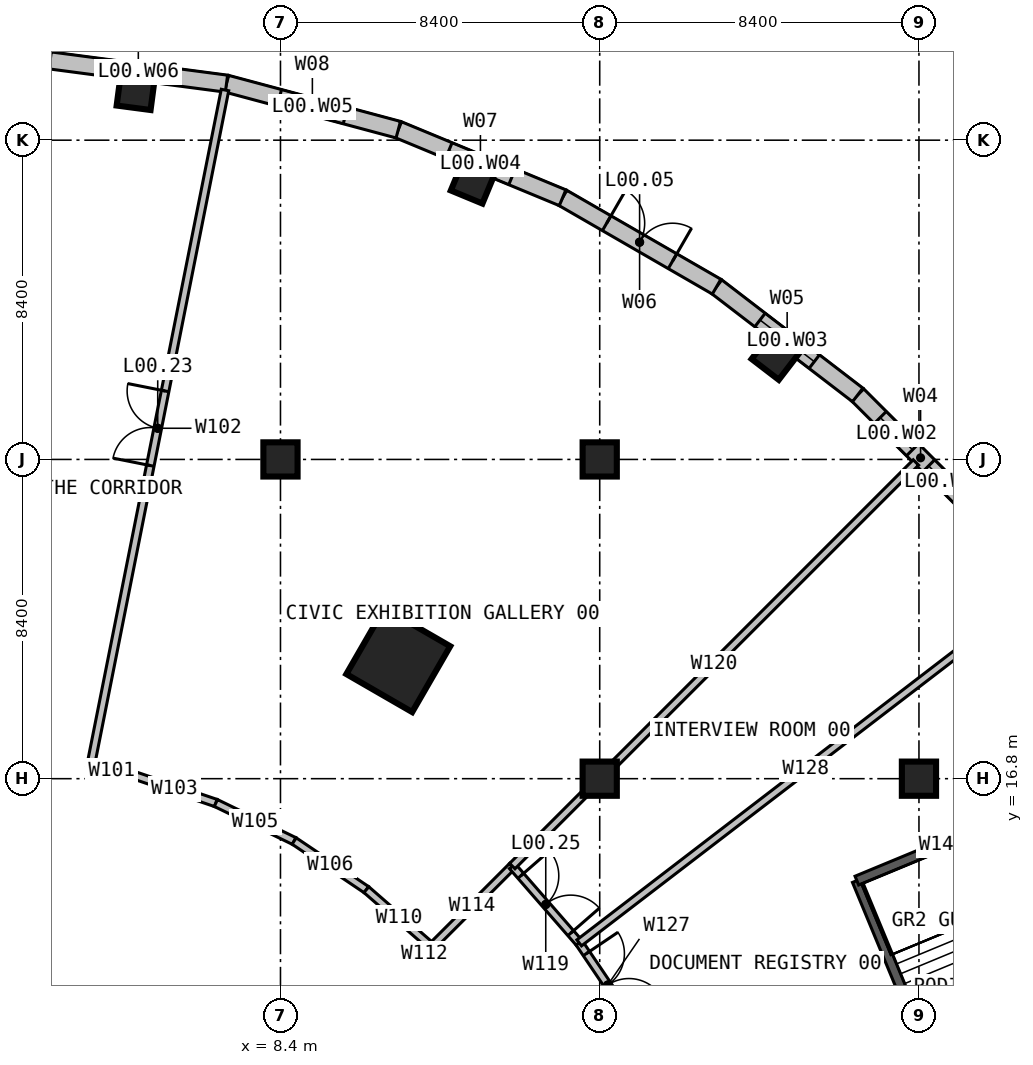
"""IFC4 building model, lengths in metres.
Left out: names, types, materials, properties, quantities, classifications, styles, units other than length and angle.
Written with IfcOpenShell. Run it as: python <this file> out.ifc"""

import sys

from ifc_helpers import new_model, si_unit, direction, frame, frame_2d, origin, origin_2d, place, context, subcontext, project, spatial, rectangle, hollow_rectangle, extrude, element, fill, save


model = new_model("IFC4")
c1 = context("Model", 3, precision=1e-05, world=origin(), true_north=direction((0.0, 1.0)))
c2 = subcontext(c1, "Body", "Model", "MODEL_VIEW")
j1 = project(units=[si_unit("LENGTHUNIT", "METRE"), si_unit("PLANEANGLEUNIT", "RADIAN")], contexts=[c1])
p1 = place(None, origin())
s1 = spatial("IfcSite", under=j1, at=p1, CompositionType="ELEMENT")
p2 = place(p1, origin())
s2 = spatial("IfcBuilding", under=s1, at=p2, CompositionType="ELEMENT")
p3 = place(p2, origin())
s3 = spatial("IfcBuildingStorey", under=s2, at=p3, CompositionType="ELEMENT", Elevation=0.0)
for number, where, z_axis, x_axis in (
    (1, (8.4, 25.2, 0.0), (0.0, 0.0, 1.0), (1.0, 0.0, 0.0)),
    (2, (16.8, 16.8, 0.0), (0.0, 0.0, 1.0), (1.0, 0.0, 0.0)),
    (3, (16.8, 25.2, 0.0), (0.0, 0.0, 1.0), (1.0, 0.0, 0.0)),
    (4, (25.2, 16.8, 0.0), (0.0, 0.0, 1.0), (1.0, 0.0, 0.0)),
    (5, (21.428, 27.926, 0.0), (0.0, 0.0, 1.0), (0.609, 0.793, 0.0)),
    (6, (13.47, 32.521, 0.0), (0.0, 0.0, 1.0), (0.383, 0.924, 0.0)),
    (7, (4.594, 34.899, 0.0), (0.0, 0.0, 1.0), (0.131, 0.991, 0.0)),
):
    element("IfcColumn", number, at=place(p3, frame(where, z_axis=z_axis, x_axis=x_axis)), inside=s3, PredefinedType="COLUMN", context=c2, shape_type="SweptSolid", body=[
        extrude(rectangle(XDim=0.9, YDim=0.9, at=origin_2d()), origin(), (0.0, 0.0, 1.0), 6.0),
    ])
p4 = place(p3, frame((11.5, 19.919, 0.0), z_axis=(0.0, 0.0, 1.0), x_axis=(0.5, 0.866025403784, 0.0)))
e8 = element("IfcColumn", 8, at=p4, inside=s3, PredefinedType="COLUMN", context=c2, shape_type="SweptSolid", body=[
    extrude(hollow_rectangle(XDim=2.0, YDim=2.0, WallThickness=0.24, at=origin_2d()), origin(), (0.0, 0.0, 1.0), 6.0),
])
p5 = place(p3, frame((26.897, 23.588, 0.0), z_axis=(0.0, 0.0, 1.0), x_axis=(-0.707106781187, 0.707106781187, 0.0)))
e9 = element("IfcWall", 9, at=p5, inside=s3, PredefinedType="SOLIDWALL", context=c2, shape_type="SweptSolid", body=[
    extrude(rectangle(XDim=4.679, YDim=0.45, at=frame_2d((2.34, 0.0))), origin(), (0.0, 0.0, 1.0), 5.7),
])
p6 = place(p5, frame((0.84, 0.0, 0.9)))
e10 = element("IfcOpeningElement", 10, at=p6, cuts=e9, PredefinedType="OPENING", context=c2, shape_type="SweptSolid", body=[
    extrude(rectangle(XDim=1.2, YDim=3.6, at=frame_2d((0.6, 1.8))), frame((0.0, 0.235, 0.0), z_axis=(0.0, -1.0, 0.0), x_axis=(1.0, 0.0, 0.0)), (0.0, 0.0, 1.0), 0.47),
])
p7 = place(p5, frame((2.64, 0.0, 0.9)))
e11 = element("IfcOpeningElement", 11, at=p7, cuts=e9, PredefinedType="OPENING", context=c2, shape_type="SweptSolid", body=[
    extrude(rectangle(XDim=1.2, YDim=3.6, at=frame_2d((0.6, 1.8))), frame((0.0, 0.235, 0.0), z_axis=(0.0, -1.0, 0.0), x_axis=(1.0, 0.0, 0.0)), (0.0, 0.0, 1.0), 0.47),
])
p8 = place(p3, frame((23.588, 26.897, 0.0), z_axis=(0.0, 0.0, 1.0), x_axis=(-0.79334682721, 0.608769916927, 0.0)))
e12 = element("IfcWall", 12, at=p8, inside=s3, PredefinedType="SOLIDWALL", context=c2, shape_type="SweptSolid", body=[
    extrude(rectangle(XDim=4.68, YDim=0.45, at=frame_2d((2.34, 0.0))), origin(), (0.0, 0.0, 1.0), 5.7),
])
p9 = place(p8, frame((1.44, 0.0, 0.9)))
e13 = element("IfcOpeningElement", 13, at=p9, cuts=e12, PredefinedType="OPENING", context=c2, shape_type="SweptSolid", body=[
    extrude(rectangle(XDim=1.8, YDim=3.6, at=frame_2d((0.9, 1.8))), frame((0.0, 0.235, 0.0), z_axis=(0.0, -1.0, 0.0), x_axis=(1.0, 0.0, 0.0)), (0.0, 0.0, 1.0), 0.47),
])
p10 = place(p3, frame((19.875, 29.746, 0.0), z_axis=(0.0, 0.0, 1.0), x_axis=(-0.866012687223, 0.500022025083, 0.0)))
e14 = element("IfcWall", 14, at=p10, inside=s3, PredefinedType="SOLIDWALL", context=c2, shape_type="SweptSolid", body=[
    extrude(rectangle(XDim=4.679, YDim=0.45, at=frame_2d((2.34, 0.0))), origin(), (0.0, 0.0, 1.0), 5.7),
])
p11 = place(p10, frame((1.34, 0.0, 0.0)))
e15 = element("IfcOpeningElement", 15, at=p11, cuts=e14, PredefinedType="OPENING", context=c2, shape_type="SweptSolid", body=[
    extrude(rectangle(XDim=2.0, YDim=3.0, at=frame_2d((1.0, 1.5))), frame((0.0, 0.235, 0.0), z_axis=(0.0, -1.0, 0.0), x_axis=(1.0, 0.0, 0.0)), (0.0, 0.0, 1.0), 0.47),
])
p12 = place(p3, frame((15.823, 32.086, 0.0), z_axis=(0.0, 0.0, 1.0), x_axis=(-0.923885213032, 0.382669718086, 0.0)))
e16 = element("IfcWall", 16, at=p12, inside=s3, PredefinedType="SOLIDWALL", context=c2, shape_type="SweptSolid", body=[
    extrude(rectangle(XDim=4.68, YDim=0.45, at=frame_2d((2.34, 0.0))), origin(), (0.0, 0.0, 1.0), 5.7),
])
p13 = place(p12, frame((1.44, 0.0, 0.9)))
e17 = element("IfcOpeningElement", 17, at=p13, cuts=e16, PredefinedType="OPENING", context=c2, shape_type="SweptSolid", body=[
    extrude(rectangle(XDim=1.8, YDim=3.6, at=frame_2d((0.9, 1.8))), frame((0.0, 0.235, 0.0), z_axis=(0.0, -1.0, 0.0), x_axis=(1.0, 0.0, 0.0)), (0.0, 0.0, 1.0), 0.47),
])
p14 = place(p3, frame((11.5, 33.876, 0.0), z_axis=(0.0, 0.0, 1.0), x_axis=(-0.965926860523, 0.258815185258, 0.0)))
e18 = element("IfcWall", 18, at=p14, inside=s3, PredefinedType="SOLIDWALL", context=c2, shape_type="SweptSolid", body=[
    extrude(rectangle(XDim=4.68, YDim=0.45, at=frame_2d((2.34, 0.0))), origin(), (0.0, 0.0, 1.0), 5.7),
])
p15 = place(p14, frame((1.44, 0.0, 0.9)))
e19 = element("IfcOpeningElement", 19, at=p15, cuts=e18, PredefinedType="OPENING", context=c2, shape_type="SweptSolid", body=[
    extrude(rectangle(XDim=1.8, YDim=3.6, at=frame_2d((0.9, 1.8))), frame((0.0, 0.235, 0.0), z_axis=(0.0, -1.0, 0.0), x_axis=(1.0, 0.0, 0.0)), (0.0, 0.0, 1.0), 0.47),
])
p16 = place(p3, frame((6.979, 35.088, 0.0), z_axis=(0.0, 0.0, 1.0), x_axis=(-0.991443459746, 0.130536838198, 0.0)))
e20 = element("IfcWall", 20, at=p16, inside=s3, PredefinedType="SOLIDWALL", context=c2, shape_type="SweptSolid", body=[
    extrude(rectangle(XDim=4.679, YDim=0.45, at=frame_2d((2.34, 0.0))), origin(), (0.0, 0.0, 1.0), 5.7),
])
p17 = place(p16, frame((1.44, 0.0, 0.9)))
e21 = element("IfcOpeningElement", 21, at=p17, cuts=e20, PredefinedType="OPENING", context=c2, shape_type="SweptSolid", body=[
    extrude(rectangle(XDim=1.8, YDim=3.6, at=frame_2d((0.9, 1.8))), frame((0.0, 0.235, 0.0), z_axis=(0.0, -1.0, 0.0), x_axis=(1.0, 0.0, 0.0)), (0.0, 0.0, 1.0), 0.47),
])
p18 = place(p3, frame((26.647, 6.681, 0.0), z_axis=(0.0, 0.0, 1.0), x_axis=(-0.382689294869, 0.923877104161, 0.0)))
e22 = element("IfcWall", 22, at=p18, inside=s3, PredefinedType="SOLIDWALL", context=c2, shape_type="SweptSolid", body=[
    extrude(rectangle(XDim=8.05, YDim=0.25, at=frame_2d((4.025, 0.0))), origin(), (0.0, 0.0, 1.0), 6.0),
])
p19 = place(p3, frame((23.566, 14.118, 0.0), z_axis=(0.0, 0.0, 1.0), x_axis=(0.923862828997, 0.382723755727, 0.0)))
e23 = element("IfcWall", 23, at=p19, inside=s3, PredefinedType="SOLIDWALL", context=c2, shape_type="SweptSolid", body=[
    extrude(rectangle(XDim=4.85, YDim=0.25, at=frame_2d((2.425, 0.0))), origin(), (0.0, 0.0, 1.0), 6.0),
])
p20 = place(p3, frame((3.4, 17.12, 0.0), z_axis=(0.0, 0.0, 1.0), x_axis=(0.981217026057, -0.19290709623, 0.0)))
e24 = element("IfcWall", 24, at=p20, inside=s3, PredefinedType="PARTITIONING", context=c2, shape_type="SweptSolid", body=[
    extrude(rectangle(XDim=1.142, YDim=0.2, at=frame_2d((0.571, 0.0))), origin(), (0.0, 0.0, 1.0), 5.7),
])
p21 = place(p3, frame((3.4, 17.12, 0.0), z_axis=(0.0, 0.0, 1.0), x_axis=(0.195060521619, 0.9807912076, 0.0)))
e25 = element("IfcWall", 25, at=p21, inside=s3, PredefinedType="PARTITIONING", context=c2, shape_type="SweptSolid", body=[
    extrude(rectangle(XDim=18.148, YDim=0.2, at=frame_2d((9.074, 0.0))), origin(), (0.0, 0.0, 1.0), 5.7),
])
p22 = place(p21, frame((8.074, 0.0, 0.0)))
e26 = element("IfcOpeningElement", 26, at=p22, cuts=e25, PredefinedType="OPENING", context=c2, shape_type="SweptSolid", body=[
    extrude(rectangle(XDim=2.0, YDim=2.4, at=frame_2d((1.0, 1.2))), frame((0.0, 0.11, 0.0), z_axis=(0.0, -1.0, 0.0), x_axis=(1.0, 0.0, 0.0)), (0.0, 0.0, 1.0), 0.22),
])
p23 = place(p3, frame((4.52, 16.9, 0.0), z_axis=(0.0, 0.0, 1.0), x_axis=(0.946929712354, -0.321440694159, 0.0)))
e27 = element("IfcWall", 27, at=p23, inside=s3, PredefinedType="PARTITIONING", context=c2, shape_type="SweptSolid", body=[
    extrude(rectangle(XDim=2.302, YDim=0.2, at=frame_2d((1.151, 0.0))), origin(), (0.0, 0.0, 1.0), 5.7),
])
p24 = place(p3, frame((6.7, 16.16, 0.0), z_axis=(0.0, 0.0, 1.0), x_axis=(0.899611086074, -0.436691989637, 0.0)))
e28 = element("IfcWall", 28, at=p24, inside=s3, PredefinedType="PARTITIONING", context=c2, shape_type="SweptSolid", body=[
    extrude(rectangle(XDim=2.29, YDim=0.2, at=frame_2d((1.145, 0.0))), origin(), (0.0, 0.0, 1.0), 5.7),
])
p25 = place(p3, frame((8.76, 15.16, 0.0), z_axis=(0.0, 0.0, 1.0), x_axis=(0.829335136553, -0.558751493311, 0.0)))
e29 = element("IfcWall", 29, at=p25, inside=s3, PredefinedType="PARTITIONING", context=c2, shape_type="SweptSolid", body=[
    extrude(rectangle(XDim=2.291, YDim=0.2, at=frame_2d((1.146, 0.0))), origin(), (0.0, 0.0, 1.0), 5.7),
])
p26 = place(p3, frame((10.66, 13.88, 0.0), z_axis=(0.0, 0.0, 1.0), x_axis=(0.753655870045, -0.657269221512, 0.0)))
e30 = element("IfcWall", 30, at=p26, inside=s3, PredefinedType="PARTITIONING", context=c2, shape_type="SweptSolid", body=[
    extrude(rectangle(XDim=2.282, YDim=0.2, at=frame_2d((1.141, 0.0))), origin(), (0.0, 0.0, 1.0), 5.7),
])
p27 = place(p3, frame((12.0, 12.0, 0.0), z_axis=(0.0, 0.0, 1.0), x_axis=(0.707106781187, 0.707106781187, 0.0)))
e31 = element("IfcWall", 31, at=p27, inside=s3, PredefinedType="PARTITIONING", context=c2, shape_type="SweptSolid", body=[
    extrude(rectangle(XDim=0.537, YDim=0.2, at=frame_2d((0.269, 0.0))), origin(), (0.0, 0.0, 1.0), 5.7),
])
p28 = place(p3, frame((12.38, 12.38, 0.0), z_axis=(0.0, 0.0, 1.0), x_axis=(0.707106781187, 0.707106781187, 0.0)))
e32 = element("IfcWall", 32, at=p28, inside=s3, PredefinedType="PARTITIONING", context=c2, shape_type="SweptSolid", body=[
    extrude(rectangle(XDim=2.998, YDim=0.2, at=frame_2d((1.499, 0.0))), origin(), (0.0, 0.0, 1.0), 5.7),
])
p29 = place(p3, frame((14.5, 14.5, 0.0), z_axis=(0.0, 0.0, 1.0), x_axis=(0.656916126811, -0.753963661151, 0.0)))
e33 = element("IfcWall", 33, at=p29, inside=s3, PredefinedType="PARTITIONING", context=c2, shape_type="SweptSolid", body=[
    extrude(rectangle(XDim=2.679, YDim=0.2, at=frame_2d((1.34, 0.0))), origin(), (0.0, 0.0, 1.0), 5.7),
])
p30 = place(p29, frame((0.34, 0.0, 0.0)))
e34 = element("IfcOpeningElement", 34, at=p30, cuts=e33, PredefinedType="OPENING", context=c2, shape_type="SweptSolid", body=[
    extrude(rectangle(XDim=2.0, YDim=2.4, at=frame_2d((1.0, 1.2))), frame((0.0, 0.11, 0.0), z_axis=(0.0, -1.0, 0.0), x_axis=(1.0, 0.0, 0.0)), (0.0, 0.0, 1.0), 0.22),
])
p31 = place(p3, frame((14.5, 14.5, 0.0), z_axis=(0.0, 0.0, 1.0), x_axis=(0.707106781187, 0.707106781187, 0.0)))
e35 = element("IfcWall", 35, at=p31, inside=s3, PredefinedType="PARTITIONING", context=c2, shape_type="SweptSolid", body=[
    extrude(rectangle(XDim=15.019, YDim=0.2, at=frame_2d((7.51, 0.0))), origin(), (0.0, 0.0, 1.0), 5.7),
])
p32 = place(p3, frame((16.26, 12.48, 0.0), z_axis=(0.0, 0.0, 1.0), x_axis=(0.559862483837, -0.828585541264, 0.0)))
e36 = element("IfcWall", 36, at=p32, inside=s3, PredefinedType="PARTITIONING", context=c2, shape_type="SweptSolid", body=[
    extrude(rectangle(XDim=2.679, YDim=0.2, at=frame_2d((1.34, 0.0))), origin(), (0.0, 0.0, 1.0), 5.7),
])
p33 = place(p32, frame((0.34, 0.0, 0.0)))
e37 = element("IfcOpeningElement", 37, at=p33, cuts=e36, PredefinedType="OPENING", context=c2, shape_type="SweptSolid", body=[
    extrude(rectangle(XDim=2.0, YDim=2.4, at=frame_2d((1.0, 1.2))), frame((0.0, 0.11, 0.0), z_axis=(0.0, -1.0, 0.0), x_axis=(1.0, 0.0, 0.0)), (0.0, 0.0, 1.0), 0.22),
])
p34 = place(p3, frame((16.26, 12.48, 0.0), z_axis=(0.0, 0.0, 1.0), x_axis=(0.79355717759, 0.608495690943, 0.0)))
e38 = element("IfcWall", 38, at=p34, inside=s3, PredefinedType="PARTITIONING", context=c2, shape_type="SweptSolid", body=[
    extrude(rectangle(XDim=15.021, YDim=0.2, at=frame_2d((7.51, 0.0))), origin(), (0.0, 0.0, 1.0), 5.7),
])
p35 = place(p6, origin())
e39 = element("IfcWindow", 39, at=p35, inside=s3, PartitioningType="SINGLE_PANEL", PredefinedType="WINDOW", context=c2, shape_type="SweptSolid", body=[
    extrude(rectangle(XDim=1.2, YDim=3.6, at=frame_2d((0.6, 1.8))), frame((0.0, 0.03, 0.0), z_axis=(0.0, -1.0, 0.0), x_axis=(1.0, 0.0, 0.0)), (0.0, 0.0, 1.0), 0.06),
])
fill(e10, e39)
p36 = place(p7, origin())
e40 = element("IfcWindow", 40, at=p36, inside=s3, PartitioningType="SINGLE_PANEL", PredefinedType="WINDOW", context=c2, shape_type="SweptSolid", body=[
    extrude(rectangle(XDim=1.2, YDim=3.6, at=frame_2d((0.6, 1.8))), frame((0.0, 0.03, 0.0), z_axis=(0.0, -1.0, 0.0), x_axis=(1.0, 0.0, 0.0)), (0.0, 0.0, 1.0), 0.06),
])
fill(e11, e40)
p37 = place(p9, origin())
e41 = element("IfcWindow", 41, at=p37, inside=s3, PartitioningType="SINGLE_PANEL", PredefinedType="WINDOW", context=c2, shape_type="SweptSolid", body=[
    extrude(rectangle(XDim=1.8, YDim=3.6, at=frame_2d((0.9, 1.8))), frame((0.0, 0.03, 0.0), z_axis=(0.0, -1.0, 0.0), x_axis=(1.0, 0.0, 0.0)), (0.0, 0.0, 1.0), 0.06),
])
fill(e13, e41)
p38 = place(p11, frame((2.0, 0.0, 0.0), z_axis=(0.0, 0.0, 1.0), x_axis=(-1.0, 0.0, 0.0)))
e42 = element("IfcDoor", 42, at=p38, inside=s3, OperationType="DOUBLE_DOOR_SINGLE_SWING", PredefinedType="DOOR", context=c2, shape_type="SweptSolid", body=[
    extrude(rectangle(XDim=2.0, YDim=3.0, at=frame_2d((1.0, 1.5))), frame((0.0, 0.025, 0.0), z_axis=(0.0, -1.0, 0.0), x_axis=(1.0, 0.0, 0.0)), (0.0, 0.0, 1.0), 0.05),
])
fill(e15, e42)
p39 = place(p13, origin())
e43 = element("IfcWindow", 43, at=p39, inside=s3, PartitioningType="SINGLE_PANEL", PredefinedType="WINDOW", context=c2, shape_type="SweptSolid", body=[
    extrude(rectangle(XDim=1.8, YDim=3.6, at=frame_2d((0.9, 1.8))), frame((0.0, 0.03, 0.0), z_axis=(0.0, -1.0, 0.0), x_axis=(1.0, 0.0, 0.0)), (0.0, 0.0, 1.0), 0.06),
])
fill(e17, e43)
p40 = place(p15, origin())
e44 = element("IfcWindow", 44, at=p40, inside=s3, PartitioningType="SINGLE_PANEL", PredefinedType="WINDOW", context=c2, shape_type="SweptSolid", body=[
    extrude(rectangle(XDim=1.8, YDim=3.6, at=frame_2d((0.9, 1.8))), frame((0.0, 0.03, 0.0), z_axis=(0.0, -1.0, 0.0), x_axis=(1.0, 0.0, 0.0)), (0.0, 0.0, 1.0), 0.06),
])
fill(e19, e44)
p41 = place(p17, origin())
e45 = element("IfcWindow", 45, at=p41, inside=s3, PartitioningType="SINGLE_PANEL", PredefinedType="WINDOW", context=c2, shape_type="SweptSolid", body=[
    extrude(rectangle(XDim=1.8, YDim=3.6, at=frame_2d((0.9, 1.8))), frame((0.0, 0.03, 0.0), z_axis=(0.0, -1.0, 0.0), x_axis=(1.0, 0.0, 0.0)), (0.0, 0.0, 1.0), 0.06),
])
fill(e21, e45)
p42 = place(p22, origin())
e46 = element("IfcDoor", 46, at=p42, inside=s3, OperationType="DOUBLE_DOOR_SINGLE_SWING", PredefinedType="DOOR", context=c2, shape_type="SweptSolid", body=[
    extrude(rectangle(XDim=2.0, YDim=2.4, at=frame_2d((1.0, 1.2))), frame((0.0, 0.025, 0.0), z_axis=(0.0, -1.0, 0.0), x_axis=(1.0, 0.0, 0.0)), (0.0, 0.0, 1.0), 0.05),
])
fill(e26, e46)
p43 = place(p30, origin())
e47 = element("IfcDoor", 47, at=p43, inside=s3, OperationType="DOUBLE_DOOR_SINGLE_SWING", PredefinedType="DOOR", context=c2, shape_type="SweptSolid", body=[
    extrude(rectangle(XDim=2.0, YDim=2.4, at=frame_2d((1.0, 1.2))), frame((0.0, 0.025, 0.0), z_axis=(0.0, -1.0, 0.0), x_axis=(1.0, 0.0, 0.0)), (0.0, 0.0, 1.0), 0.05),
])
fill(e34, e47)
p44 = place(p33, origin())
e48 = element("IfcDoor", 48, at=p44, inside=s3, OperationType="DOUBLE_DOOR_SINGLE_SWING", PredefinedType="DOOR", context=c2, shape_type="SweptSolid", body=[
    extrude(rectangle(XDim=2.0, YDim=2.4, at=frame_2d((1.0, 1.2))), frame((0.0, 0.025, 0.0), z_axis=(0.0, -1.0, 0.0), x_axis=(1.0, 0.0, 0.0)), (0.0, 0.0, 1.0), 0.05),
])
fill(e37, e48)
save(model, sys.argv[1])
